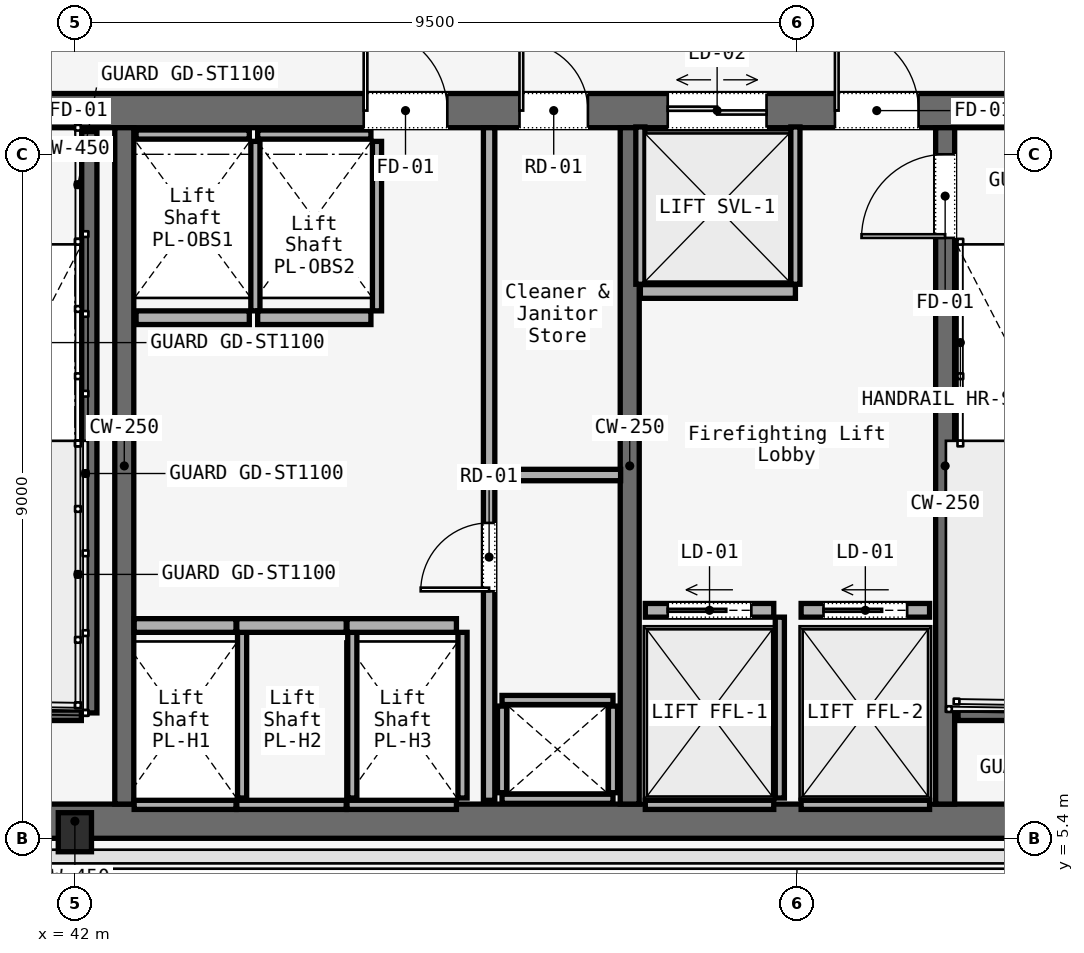
"""IFC4 building model, lengths in metres.
Left out: names, types, materials, properties, quantities, classifications, styles, units other than length and angle.
Written with IfcOpenShell. Run it as: python <this file> out.ifc"""

import sys

from ifc_helpers import new_model, si_unit, direction, frame, frame_2d, origin, origin_2d, place, context, subcontext, project, spatial, rectangle, i_section, extrude, element, fill, save


model = new_model("IFC4")
c1 = context("Model", 3, precision=1e-05, world=origin(), true_north=direction((0.0, 1.0)))
c2 = subcontext(c1, "Body", "Model", "MODEL_VIEW")
j1 = project(units=[si_unit("LENGTHUNIT", "METRE"), si_unit("PLANEANGLEUNIT", "RADIAN")], contexts=[c1])
p1 = place(None, origin())
s1 = spatial("IfcSite", under=j1, at=p1, CompositionType="ELEMENT")
p2 = place(p1, origin())
s2 = spatial("IfcBuilding", under=s1, at=p2, CompositionType="ELEMENT")
p3 = place(p2, frame((0.0, 0.0, 96.8)))
s3 = spatial("IfcBuildingStorey", under=s2, at=p3, CompositionType="ELEMENT", Elevation=96.8)
p4 = place(p3, frame((26.45, 14.975, 0.0), z_axis=(0.0, 0.0, 1.0), x_axis=(1.0, 0.0, 0.0)))
e1 = element("IfcWall", 1, at=p4, inside=s3, PredefinedType="SOLIDWALL", context=c2, shape_type="SweptSolid", body=[
    extrude(rectangle(XDim=31.1, YDim=0.45, at=frame_2d((15.55, 0.0))), origin(), (0.0, 0.0, 1.0), 3.58),
])
p5 = place(p4, frame((1.65, 0.0, 0.0)))
e2 = element("IfcOpeningElement", 2, at=p5, cuts=e1, PredefinedType="OPENING", context=c2, shape_type="SweptSolid", body=[
    extrude(rectangle(XDim=1.1, YDim=2.2, at=frame_2d((0.55, 1.1))), frame((0.0, 0.225, 0.0), z_axis=(0.0, -1.0, 0.0), x_axis=(1.0, 0.0, 0.0)), (0.0, 0.0, 1.0), 0.45),
])
p6 = place(p4, frame((13.65, 0.0, 0.0)))
e3 = element("IfcOpeningElement", 3, at=p6, cuts=e1, PredefinedType="OPENING", context=c2, shape_type="SweptSolid", body=[
    extrude(rectangle(XDim=1.1, YDim=2.2, at=frame_2d((0.55, 1.1))), frame((0.0, 0.225, 0.0), z_axis=(0.0, -1.0, 0.0), x_axis=(1.0, 0.0, 0.0)), (0.0, 0.0, 1.0), 0.45),
])
p7 = place(p4, frame((25.55, 0.0, 0.0)))
e4 = element("IfcOpeningElement", 4, at=p7, cuts=e1, PredefinedType="OPENING", context=c2, shape_type="SweptSolid", body=[
    extrude(rectangle(XDim=1.1, YDim=2.2, at=frame_2d((0.55, 1.1))), frame((0.0, 0.225, 0.0), z_axis=(0.0, -1.0, 0.0), x_axis=(1.0, 0.0, 0.0)), (0.0, 0.0, 1.0), 0.45),
])
p8 = place(p4, frame((10.7, 0.0, 0.0)))
e5 = element("IfcOpeningElement", 5, at=p8, cuts=e1, PredefinedType="OPENING", context=c2, shape_type="SweptSolid", body=[
    extrude(rectangle(XDim=1.4, YDim=2.2, at=frame_2d((0.7, 1.1))), frame((0.0, 0.225, 0.0), z_axis=(0.0, -1.0, 0.0), x_axis=(1.0, 0.0, 0.0)), (0.0, 0.0, 1.0), 0.45),
])
p9 = place(p4, frame((19.35, 0.0, 0.0)))
e6 = element("IfcOpeningElement", 6, at=p9, cuts=e1, PredefinedType="OPENING", context=c2, shape_type="SweptSolid", body=[
    extrude(rectangle(XDim=1.1, YDim=2.2, at=frame_2d((0.55, 1.1))), frame((0.0, 0.225, 0.0), z_axis=(0.0, -1.0, 0.0), x_axis=(1.0, 0.0, 0.0)), (0.0, 0.0, 1.0), 0.45),
])
p10 = place(p4, frame((21.4, 0.0, 0.0)))
e7 = element("IfcOpeningElement", 7, at=p10, cuts=e1, PredefinedType="OPENING", context=c2, shape_type="SweptSolid", body=[
    extrude(rectangle(XDim=0.9, YDim=2.1, at=frame_2d((0.45, 1.05))), frame((0.0, 0.225, 0.0), z_axis=(0.0, -1.0, 0.0), x_axis=(1.0, 0.0, 0.0)), (0.0, 0.0, 1.0), 0.45),
])
p11 = place(p4, frame((23.35, 0.0, 0.0)))
e8 = element("IfcOpeningElement", 8, at=p11, cuts=e1, PredefinedType="OPENING", context=c2, shape_type="SweptSolid", body=[
    extrude(rectangle(XDim=1.3, YDim=2.3, at=frame_2d((0.65, 1.15))), frame((0.0, 0.225, 0.0), z_axis=(0.0, -1.0, 0.0), x_axis=(1.0, 0.0, 0.0)), (0.0, 0.0, 1.0), 0.45),
])
p12 = place(p3, frame((26.45, 5.625, 0.0), z_axis=(0.0, 0.0, 1.0), x_axis=(1.0, 0.0, 0.0)))
e9 = element("IfcWall", 9, at=p12, inside=s3, PredefinedType="SOLIDWALL", context=c2, shape_type="SweptSolid", body=[
    extrude(rectangle(XDim=31.1, YDim=0.45, at=frame_2d((15.55, 0.0))), origin(), (0.0, 0.0, 1.0), 3.58),
])
for number, where, z_axis, x_axis in (
    (10, (42.65, 5.85, 0.0), (0.0, 0.0, 1.0), (0.0, 1.0, 0.0)),
    (11, (49.3, 5.85, 0.0), (0.0, 0.0, 1.0), (0.0, 1.0, 0.0)),
):
    element("IfcWall", number, at=place(p3, frame(where, z_axis=z_axis, x_axis=x_axis)), inside=s3, PredefinedType="SOLIDWALL", context=c2, shape_type="SweptSolid", body=[
        extrude(rectangle(XDim=8.9, YDim=0.25, at=frame_2d((4.45, 0.0))), origin(), (0.0, 0.0, 1.0), 3.58),
    ])
p13 = place(p3, frame((53.45, 5.85, 0.0), z_axis=(0.0, 0.0, 1.0), x_axis=(0.0, 1.0, 0.0)))
e12 = element("IfcWall", 12, at=p13, inside=s3, PredefinedType="SOLIDWALL", context=c2, shape_type="SweptSolid", body=[
    extrude(rectangle(XDim=8.9, YDim=0.25, at=frame_2d((4.45, 0.0))), origin(), (0.0, 0.0, 1.0), 3.58),
])
p14 = place(p13, frame((7.45, 0.0, 0.0)))
e13 = element("IfcOpeningElement", 13, at=p14, cuts=e12, PredefinedType="OPENING", context=c2, shape_type="SweptSolid", body=[
    extrude(rectangle(XDim=1.1, YDim=2.2, at=frame_2d((0.55, 1.1))), frame((0.0, 0.125, 0.0), z_axis=(0.0, -1.0, 0.0), x_axis=(1.0, 0.0, 0.0)), (0.0, 0.0, 1.0), 0.25),
])
p15 = place(p3, frame((42.0, 5.48, 0.0), z_axis=(0.0, 0.0, 1.0), x_axis=(1.0, 0.0, 0.0)))
e14 = element("IfcColumn", 14, at=p15, inside=s3, PredefinedType="COLUMN", context=c2, shape_type="SweptSolid", body=[
    extrude(i_section(OverallWidth=0.437, OverallDepth=0.514, WebThickness=0.061, FlangeThickness=0.077, FilletRadius=0.015, at=origin_2d()), origin(), (0.0, 0.0, 1.0), 3.58),
])
p16 = place(p3, frame((42.19, 14.7, 0.0), z_axis=(0.0, 0.0, 1.0), x_axis=(0.0, -1.0, 0.0)))
e15 = element("IfcWall", 15, at=p16, inside=s3, PredefinedType="SOLIDWALL", context=c2, shape_type="SweptSolid", body=[
    extrude(rectangle(XDim=7.65, YDim=0.2, at=frame_2d((3.825, 0.0))), origin(), (0.0, 0.0, 1.0), 3.8),
])
for number, where, z_axis, x_axis in (
    (16, (38.97, 7.05, 0.0), (0.0, 0.0, 1.0), (1.0, 0.0, 0.0)),
    (17, (53.62, 7.05, 0.0), (0.0, 0.0, 1.0), (1.0, 0.0, 0.0)),
):
    element("IfcWall", number, at=place(p3, frame(where, z_axis=z_axis, x_axis=x_axis)), inside=s3, PredefinedType="SOLIDWALL", context=c2, shape_type="SweptSolid", body=[
        extrude(rectangle(XDim=3.115, YDim=0.2, at=frame_2d((1.558, 0.0))), origin(), (0.0, 0.0, 1.0), 3.8),
    ])
for number, where, z_axis, x_axis in (
    (18, (47.62, 5.92, 0.0), (0.0, 0.0, 1.0), (1.0, 0.0, 0.0)),
    (19, (47.62, 7.22, 0.0), (0.0, 0.0, 1.0), (1.0, 0.0, 0.0)),
):
    element("IfcWall", number, at=place(p3, frame(where, z_axis=z_axis, x_axis=x_axis)), inside=s3, PredefinedType="SOLIDWALL", context=c2, shape_type="SweptSolid", body=[
        extrude(rectangle(XDim=1.46, YDim=0.12, at=frame_2d((0.73, 0.0))), origin(), (0.0, 0.0, 1.0), 2.95),
    ])
for number, where, z_axis, x_axis in (
    (20, (47.62, 6.0, 0.0), (0.0, 0.0, 1.0), (0.0, 1.0, 0.0)),
    (21, (49.08, 6.0, 0.0), (0.0, 0.0, 1.0), (0.0, 1.0, 0.0)),
):
    element("IfcWall", number, at=place(p3, frame(where, z_axis=z_axis, x_axis=x_axis)), inside=s3, PredefinedType="SOLIDWALL", context=c2, shape_type="SweptSolid", body=[
        extrude(rectangle(XDim=1.14, YDim=0.12, at=frame_2d((0.57, 0.0))), origin(), (0.0, 0.0, 1.0), 2.95),
    ])
p17 = place(p3, frame((47.45, 5.9, 0.0), z_axis=(0.0, 0.0, 1.0), x_axis=(0.0, 1.0, 0.0)))
e22 = element("IfcWall", 22, at=p17, inside=s3, PredefinedType="PARTITIONING", context=c2, shape_type="SweptSolid", body=[
    extrude(rectangle(XDim=8.85, YDim=0.15, at=frame_2d((4.425, 0.0))), origin(), (0.0, 0.0, 1.0), 2.95),
])
p18 = place(p17, frame((2.75, 0.0, 0.0)))
e23 = element("IfcOpeningElement", 23, at=p18, cuts=e22, PredefinedType="OPENING", context=c2, shape_type="SweptSolid", body=[
    extrude(rectangle(XDim=0.9, YDim=2.1, at=frame_2d((0.45, 1.05))), frame((0.0, 0.075, 0.0), z_axis=(0.0, -1.0, 0.0), x_axis=(1.0, 0.0, 0.0)), (0.0, 0.0, 1.0), 0.15),
])
p19 = place(p3, frame((47.45, 10.18, 0.0), z_axis=(0.0, 0.0, 1.0), x_axis=(1.0, 0.0, 0.0)))
e24 = element("IfcWall", 24, at=p19, inside=s3, PredefinedType="PARTITIONING", context=c2, shape_type="SweptSolid", body=[
    extrude(rectangle(XDim=1.73, YDim=0.15, at=frame_2d((0.865, 0.0))), origin(), (0.0, 0.0, 1.0), 2.95),
])
p20 = place(p3, frame((42.78, 8.2, 0.0), z_axis=(0.0, 0.0, 1.0), x_axis=(1.0, 0.0, 0.0)))
e25 = element("IfcWall", 25, at=p20, inside=s3, PredefinedType="SOLIDWALL", context=c2, shape_type="SweptSolid", body=[
    extrude(rectangle(XDim=1.34, YDim=0.18, at=frame_2d((0.67, 0.0))), origin(), (0.0, 0.0, 1.0), 2.95),
])
p21 = place(p3, frame((42.78, 5.84, 0.0), z_axis=(0.0, 0.0, 1.0), x_axis=(1.0, 0.0, 0.0)))
e26 = element("IfcWall", 26, at=p21, inside=s3, PredefinedType="SOLIDWALL", context=c2, shape_type="SweptSolid", body=[
    extrude(rectangle(XDim=1.34, YDim=0.12, at=frame_2d((0.67, 0.0))), origin(), (0.0, 0.0, 1.0), 2.95),
])
p22 = place(p3, frame((44.2, 5.93, 0.0), z_axis=(0.0, 0.0, 1.0), x_axis=(0.0, 1.0, 0.0)))
e27 = element("IfcWall", 27, at=p22, inside=s3, PredefinedType="SOLIDWALL", context=c2, shape_type="SweptSolid", body=[
    extrude(rectangle(XDim=2.18, YDim=0.12, at=frame_2d((1.09, 0.0))), origin(), (0.0, 0.0, 1.0), 2.95),
])
p23 = place(p3, frame((44.13, 8.2, 0.0), z_axis=(0.0, 0.0, 1.0), x_axis=(1.0, 0.0, 0.0)))
e28 = element("IfcWall", 28, at=p23, inside=s3, PredefinedType="SOLIDWALL", context=c2, shape_type="SweptSolid", body=[
    extrude(rectangle(XDim=1.44, YDim=0.18, at=frame_2d((0.72, 0.0))), origin(), (0.0, 0.0, 1.0), 2.95),
])
p24 = place(p3, frame((44.13, 5.84, 0.0), z_axis=(0.0, 0.0, 1.0), x_axis=(1.0, 0.0, 0.0)))
e29 = element("IfcWall", 29, at=p24, inside=s3, PredefinedType="SOLIDWALL", context=c2, shape_type="SweptSolid", body=[
    extrude(rectangle(XDim=1.44, YDim=0.12, at=frame_2d((0.72, 0.0))), origin(), (0.0, 0.0, 1.0), 2.95),
])
p25 = place(p3, frame((45.65, 5.93, 0.0), z_axis=(0.0, 0.0, 1.0), x_axis=(0.0, 1.0, 0.0)))
e30 = element("IfcWall", 30, at=p25, inside=s3, PredefinedType="SOLIDWALL", context=c2, shape_type="SweptSolid", body=[
    extrude(rectangle(XDim=2.18, YDim=0.12, at=frame_2d((1.09, 0.0))), origin(), (0.0, 0.0, 1.0), 2.95),
])
p26 = place(p3, frame((45.58, 8.2, 0.0), z_axis=(0.0, 0.0, 1.0), x_axis=(1.0, 0.0, 0.0)))
e31 = element("IfcWall", 31, at=p26, inside=s3, PredefinedType="SOLIDWALL", context=c2, shape_type="SweptSolid", body=[
    extrude(rectangle(XDim=1.44, YDim=0.18, at=frame_2d((0.72, 0.0))), origin(), (0.0, 0.0, 1.0), 2.95),
])
p27 = place(p3, frame((45.58, 5.84, 0.0), z_axis=(0.0, 0.0, 1.0), x_axis=(1.0, 0.0, 0.0)))
e32 = element("IfcWall", 32, at=p27, inside=s3, PredefinedType="SOLIDWALL", context=c2, shape_type="SweptSolid", body=[
    extrude(rectangle(XDim=1.44, YDim=0.12, at=frame_2d((0.72, 0.0))), origin(), (0.0, 0.0, 1.0), 2.95),
])
p28 = place(p3, frame((47.1, 5.93, 0.0), z_axis=(0.0, 0.0, 1.0), x_axis=(0.0, 1.0, 0.0)))
e33 = element("IfcWall", 33, at=p28, inside=s3, PredefinedType="SOLIDWALL", context=c2, shape_type="SweptSolid", body=[
    extrude(rectangle(XDim=2.18, YDim=0.12, at=frame_2d((1.09, 0.0))), origin(), (0.0, 0.0, 1.0), 2.95),
])
p29 = place(p3, frame((42.805, 12.25, 0.0), z_axis=(0.0, 0.0, 1.0), x_axis=(1.0, 0.0, 0.0)))
e34 = element("IfcWall", 34, at=p29, inside=s3, PredefinedType="SOLIDWALL", context=c2, shape_type="SweptSolid", body=[
    extrude(rectangle(XDim=1.49, YDim=0.18, at=frame_2d((0.745, 0.0))), origin(), (0.0, 0.0, 1.0), 2.95),
])
p30 = place(p3, frame((42.805, 14.66, 0.0), z_axis=(0.0, 0.0, 1.0), x_axis=(1.0, 0.0, 0.0)))
e35 = element("IfcWall", 35, at=p30, inside=s3, PredefinedType="SOLIDWALL", context=c2, shape_type="SweptSolid", body=[
    extrude(rectangle(XDim=1.49, YDim=0.12, at=frame_2d((0.745, 0.0))), origin(), (0.0, 0.0, 1.0), 2.95),
])
p31 = place(p3, frame((44.375, 12.34, 0.0), z_axis=(0.0, 0.0, 1.0), x_axis=(0.0, 1.0, 0.0)))
e36 = element("IfcWall", 36, at=p31, inside=s3, PredefinedType="SOLIDWALL", context=c2, shape_type="SweptSolid", body=[
    extrude(rectangle(XDim=2.23, YDim=0.12, at=frame_2d((1.115, 0.0))), origin(), (0.0, 0.0, 1.0), 2.95),
])
p32 = place(p3, frame((44.405, 12.25, 0.0), z_axis=(0.0, 0.0, 1.0), x_axis=(1.0, 0.0, 0.0)))
e37 = element("IfcWall", 37, at=p32, inside=s3, PredefinedType="SOLIDWALL", context=c2, shape_type="SweptSolid", body=[
    extrude(rectangle(XDim=1.49, YDim=0.18, at=frame_2d((0.745, 0.0))), origin(), (0.0, 0.0, 1.0), 2.95),
])
p33 = place(p3, frame((44.405, 14.66, 0.0), z_axis=(0.0, 0.0, 1.0), x_axis=(1.0, 0.0, 0.0)))
e38 = element("IfcWall", 38, at=p33, inside=s3, PredefinedType="SOLIDWALL", context=c2, shape_type="SweptSolid", body=[
    extrude(rectangle(XDim=1.49, YDim=0.12, at=frame_2d((0.745, 0.0))), origin(), (0.0, 0.0, 1.0), 2.95),
])
p34 = place(p3, frame((45.975, 12.34, 0.0), z_axis=(0.0, 0.0, 1.0), x_axis=(0.0, 1.0, 0.0)))
e39 = element("IfcWall", 39, at=p34, inside=s3, PredefinedType="SOLIDWALL", context=c2, shape_type="SweptSolid", body=[
    extrude(rectangle(XDim=2.23, YDim=0.12, at=frame_2d((1.115, 0.0))), origin(), (0.0, 0.0, 1.0), 2.95),
])
p35 = place(p3, frame((49.505, 8.4, 0.0), z_axis=(0.0, 0.0, 1.0), x_axis=(1.0, 0.0, 0.0)))
e40 = element("IfcWall", 40, at=p35, inside=s3, PredefinedType="SOLIDWALL", context=c2, shape_type="SweptSolid", body=[
    extrude(rectangle(XDim=1.69, YDim=0.18, at=frame_2d((0.845, 0.0))), origin(), (0.0, 0.0, 1.0), 2.95),
])
p36 = place(p35, frame((0.295, 0.0, 0.0)))
e41 = element("IfcOpeningElement", 41, at=p36, cuts=e40, PredefinedType="OPENING", context=c2, shape_type="SweptSolid", body=[
    extrude(rectangle(XDim=1.1, YDim=2.2, at=frame_2d((0.55, 1.1))), frame((0.0, 0.09, 0.0), z_axis=(0.0, -1.0, 0.0), x_axis=(1.0, 0.0, 0.0)), (0.0, 0.0, 1.0), 0.18),
])
p37 = place(p3, frame((49.505, 5.84, 0.0), z_axis=(0.0, 0.0, 1.0), x_axis=(1.0, 0.0, 0.0)))
e42 = element("IfcWall", 42, at=p37, inside=s3, PredefinedType="SOLIDWALL", context=c2, shape_type="SweptSolid", body=[
    extrude(rectangle(XDim=1.69, YDim=0.12, at=frame_2d((0.845, 0.0))), origin(), (0.0, 0.0, 1.0), 2.95),
])
p38 = place(p3, frame((51.275, 5.93, 0.0), z_axis=(0.0, 0.0, 1.0), x_axis=(0.0, 1.0, 0.0)))
e43 = element("IfcWall", 43, at=p38, inside=s3, PredefinedType="SOLIDWALL", context=c2, shape_type="SweptSolid", body=[
    extrude(rectangle(XDim=2.38, YDim=0.12, at=frame_2d((1.19, 0.0))), origin(), (0.0, 0.0, 1.0), 2.95),
])
p39 = place(p3, frame((51.555, 8.4, 0.0), z_axis=(0.0, 0.0, 1.0), x_axis=(1.0, 0.0, 0.0)))
e44 = element("IfcWall", 44, at=p39, inside=s3, PredefinedType="SOLIDWALL", context=c2, shape_type="SweptSolid", body=[
    extrude(rectangle(XDim=1.69, YDim=0.18, at=frame_2d((0.845, 0.0))), origin(), (0.0, 0.0, 1.0), 2.95),
])
p40 = place(p39, frame((0.295, 0.0, 0.0)))
e45 = element("IfcOpeningElement", 45, at=p40, cuts=e44, PredefinedType="OPENING", context=c2, shape_type="SweptSolid", body=[
    extrude(rectangle(XDim=1.1, YDim=2.2, at=frame_2d((0.55, 1.1))), frame((0.0, 0.09, 0.0), z_axis=(0.0, -1.0, 0.0), x_axis=(1.0, 0.0, 0.0)), (0.0, 0.0, 1.0), 0.18),
])
p41 = place(p3, frame((51.555, 5.84, 0.0), z_axis=(0.0, 0.0, 1.0), x_axis=(1.0, 0.0, 0.0)))
e46 = element("IfcWall", 46, at=p41, inside=s3, PredefinedType="SOLIDWALL", context=c2, shape_type="SweptSolid", body=[
    extrude(rectangle(XDim=1.69, YDim=0.12, at=frame_2d((0.845, 0.0))), origin(), (0.0, 0.0, 1.0), 2.95),
])
p42 = place(p3, frame((49.44, 12.595, 0.0), z_axis=(0.0, 0.0, 1.0), x_axis=(1.0, 0.0, 0.0)))
e47 = element("IfcWall", 47, at=p42, inside=s3, PredefinedType="SOLIDWALL", context=c2, shape_type="SweptSolid", body=[
    extrude(rectangle(XDim=2.04, YDim=0.18, at=frame_2d((1.02, 0.0))), origin(), (0.0, 0.0, 1.0), 2.95),
])
for number, where, z_axis, x_axis in (
    (48, (49.44, 12.69, 0.0), (0.0, 0.0, 1.0), (0.0, 1.0, 0.0)),
    (49, (51.48, 12.69, 0.0), (0.0, 0.0, 1.0), (0.0, 1.0, 0.0)),
):
    element("IfcWall", number, at=place(p3, frame(where, z_axis=z_axis, x_axis=x_axis)), inside=s3, PredefinedType="SOLIDWALL", context=c2, shape_type="SweptSolid", body=[
        extrude(rectangle(XDim=2.07, YDim=0.12, at=frame_2d((1.035, 0.0))), origin(), (0.0, 0.0, 1.0), 2.95),
    ])
p43 = place(p7, origin())
e50 = element("IfcDoor", 50, at=p43, inside=s3, OperationType="SINGLE_SWING_RIGHT", PredefinedType="DOOR", context=c2, shape_type="SweptSolid", body=[
    extrude(rectangle(XDim=1.1, YDim=2.2, at=frame_2d((0.55, 1.1))), frame((0.0, 0.025, 0.0), z_axis=(0.0, -1.0, 0.0), x_axis=(1.0, 0.0, 0.0)), (0.0, 0.0, 1.0), 0.05),
])
fill(e4, e50)
p44 = place(p9, origin())
e51 = element("IfcDoor", 51, at=p44, inside=s3, OperationType="SINGLE_SWING_LEFT", PredefinedType="DOOR", context=c2, shape_type="SweptSolid", body=[
    extrude(rectangle(XDim=1.1, YDim=2.2, at=frame_2d((0.55, 1.1))), frame((0.0, 0.025, 0.0), z_axis=(0.0, -1.0, 0.0), x_axis=(1.0, 0.0, 0.0)), (0.0, 0.0, 1.0), 0.05),
])
fill(e6, e51)
p45 = place(p10, origin())
e52 = element("IfcDoor", 52, at=p45, inside=s3, OperationType="SINGLE_SWING_LEFT", PredefinedType="DOOR", context=c2, shape_type="SweptSolid", body=[
    extrude(rectangle(XDim=0.9, YDim=2.1, at=frame_2d((0.45, 1.05))), frame((0.0, 0.025, 0.0), z_axis=(0.0, -1.0, 0.0), x_axis=(1.0, 0.0, 0.0)), (0.0, 0.0, 1.0), 0.05),
])
fill(e7, e52)
p46 = place(p14, origin())
e53 = element("IfcDoor", 53, at=p46, inside=s3, OperationType="SINGLE_SWING_LEFT", PredefinedType="DOOR", context=c2, shape_type="SweptSolid", body=[
    extrude(rectangle(XDim=1.1, YDim=2.2, at=frame_2d((0.55, 1.1))), frame((0.0, 0.025, 0.0), z_axis=(0.0, -1.0, 0.0), x_axis=(1.0, 0.0, 0.0)), (0.0, 0.0, 1.0), 0.05),
])
fill(e13, e53)
p47 = place(p18, origin())
e54 = element("IfcDoor", 54, at=p47, inside=s3, OperationType="SINGLE_SWING_RIGHT", PredefinedType="DOOR", context=c2, shape_type="SweptSolid", body=[
    extrude(rectangle(XDim=0.9, YDim=2.1, at=frame_2d((0.45, 1.05))), frame((0.0, 0.025, 0.0), z_axis=(0.0, -1.0, 0.0), x_axis=(1.0, 0.0, 0.0)), (0.0, 0.0, 1.0), 0.05),
])
fill(e23, e54)
p48 = place(p36, origin())
e55 = element("IfcDoor", 55, at=p48, inside=s3, OperationType="SLIDING_TO_LEFT", PredefinedType="DOOR", context=c2, shape_type="SweptSolid", body=[
    extrude(rectangle(XDim=1.1, YDim=2.2, at=frame_2d((0.55, 1.1))), frame((0.0, 0.025, 0.0), z_axis=(0.0, -1.0, 0.0), x_axis=(1.0, 0.0, 0.0)), (0.0, 0.0, 1.0), 0.05),
])
fill(e41, e55)
p49 = place(p40, origin())
e56 = element("IfcDoor", 56, at=p49, inside=s3, OperationType="SLIDING_TO_LEFT", PredefinedType="DOOR", context=c2, shape_type="SweptSolid", body=[
    extrude(rectangle(XDim=1.1, YDim=2.2, at=frame_2d((0.55, 1.1))), frame((0.0, 0.025, 0.0), z_axis=(0.0, -1.0, 0.0), x_axis=(1.0, 0.0, 0.0)), (0.0, 0.0, 1.0), 0.05),
])
fill(e45, e56)
p50 = place(p11, origin())
e57 = element("IfcDoor", 57, at=p50, inside=s3, OperationType="DOUBLE_DOOR_SLIDING", PredefinedType="DOOR", context=c2, shape_type="SweptSolid", body=[
    extrude(rectangle(XDim=1.3, YDim=2.3, at=frame_2d((0.65, 1.15))), frame((0.0, 0.025, 0.0), z_axis=(0.0, -1.0, 0.0), x_axis=(1.0, 0.0, 0.0)), (0.0, 0.0, 1.0), 0.05),
])
fill(e8, e57)
save(model, sys.argv[1])
